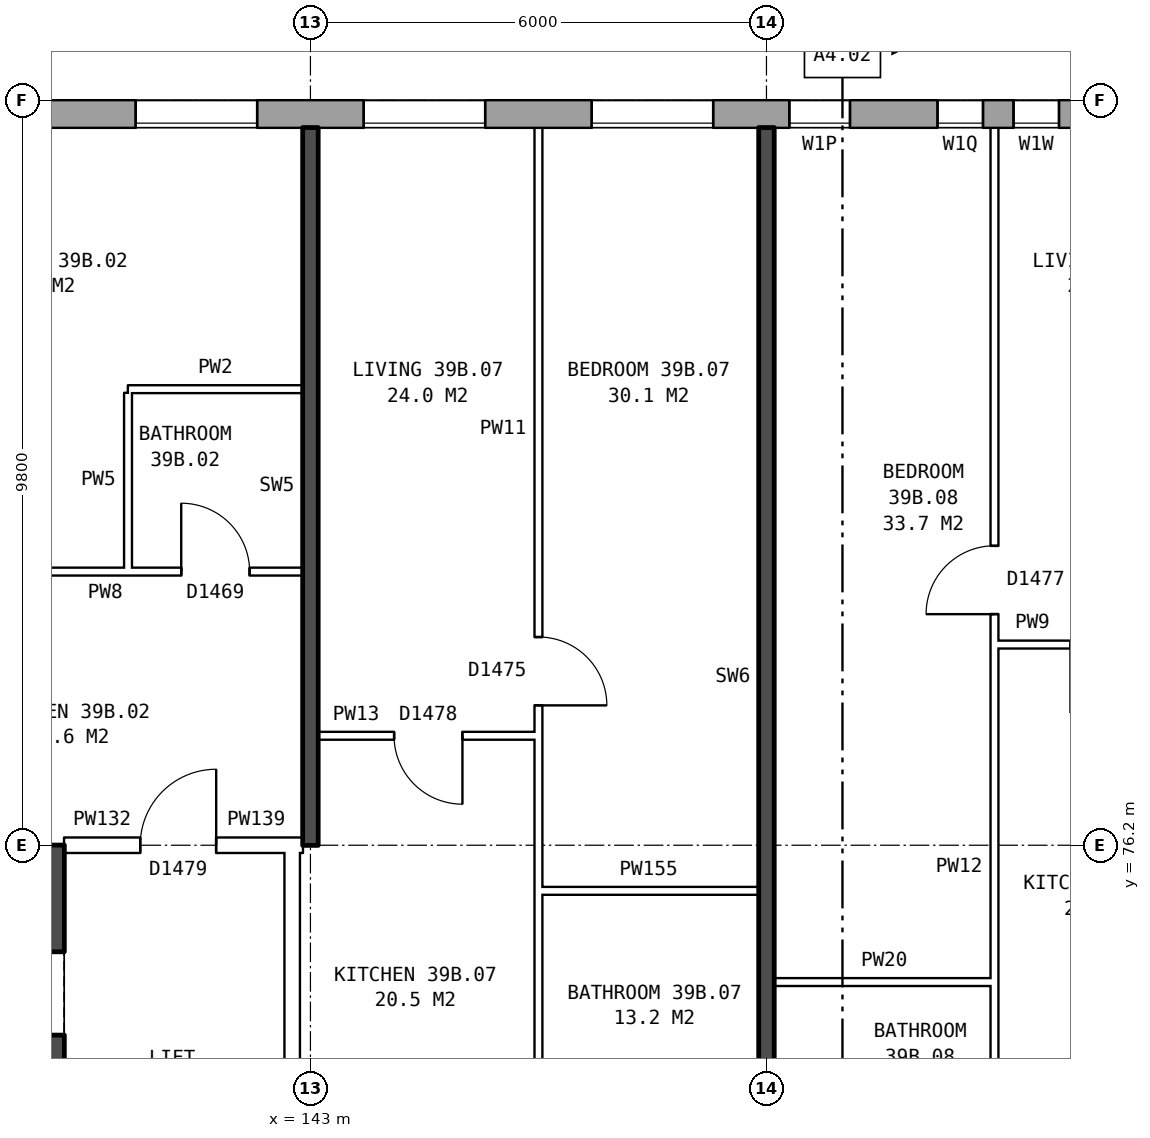
"""IFC4 building model, lengths in metres.
Left out: names, types, materials, properties, quantities, classifications, styles, units other than length and angle.
Written with IfcOpenShell. Run it as: python <this file> out.ifc"""

import sys

from ifc_helpers import new_model, si_unit, direction, frame, frame_2d, origin, place, context, subcontext, project, spatial, rectangle, extrude, element, fill, save


model = new_model("IFC4")
c1 = context("Model", 3, precision=1e-05, world=origin(), true_north=direction((0.0, 1.0)))
c2 = subcontext(c1, "Body", "Model", "MODEL_VIEW")
j1 = project(units=[si_unit("LENGTHUNIT", "METRE"), si_unit("PLANEANGLEUNIT", "RADIAN")], contexts=[c1])
p1 = place(None, origin())
s1 = spatial("IfcSite", under=j1, at=p1, CompositionType="ELEMENT")
p2 = place(p1, origin())
s2 = spatial("IfcBuilding", under=s1, at=p2, CompositionType="ELEMENT")
p3 = place(p2, frame((0.0, 0.0, 139.2)))
s3 = spatial("IfcBuildingStorey", under=s2, at=p3, CompositionType="ELEMENT", Elevation=139.2)
p4 = place(p3, frame((169.675, 85.82, 0.0), z_axis=(0.0, 0.0, 1.0), x_axis=(-1.0, 0.0, 0.0)))
e1 = element("IfcWall", 1, at=p4, inside=s3, PredefinedType="STANDARD", context=c2, shape_type="SweptSolid", body=[
    extrude(rectangle(XDim=35.601, YDim=0.36, at=frame_2d((17.8, 0.0))), origin(), (0.0, 0.0, 1.0), 2.85),
])
p5 = place(p4, frame((0.375, 0.0, 0.8)))
e2 = element("IfcOpeningElement", 2, at=p5, cuts=e1, PredefinedType="OPENING", context=c2, shape_type="SweptSolid", body=[
    extrude(rectangle(XDim=1.6, YDim=1.8, at=frame_2d((0.8, 0.9))), frame((0.0, 0.19, 0.0), z_axis=(0.0, -1.0, 0.0), x_axis=(1.0, 0.0, 0.0)), (0.0, 0.0, 1.0), 0.38),
])
p6 = place(p4, frame((3.375, 0.0, 0.8)))
e3 = element("IfcOpeningElement", 3, at=p6, cuts=e1, PredefinedType="OPENING", context=c2, shape_type="SweptSolid", body=[
    extrude(rectangle(XDim=1.6, YDim=1.8, at=frame_2d((0.8, 0.9))), frame((0.0, 0.19, 0.0), z_axis=(0.0, -1.0, 0.0), x_axis=(1.0, 0.0, 0.0)), (0.0, 0.0, 1.0), 0.38),
])
p7 = place(p4, frame((6.375, 0.0, 0.8)))
e4 = element("IfcOpeningElement", 4, at=p7, cuts=e1, PredefinedType="OPENING", context=c2, shape_type="SweptSolid", body=[
    extrude(rectangle(XDim=1.6, YDim=1.8, at=frame_2d((0.8, 0.9))), frame((0.0, 0.19, 0.0), z_axis=(0.0, -1.0, 0.0), x_axis=(1.0, 0.0, 0.0)), (0.0, 0.0, 1.0), 0.38),
])
p8 = place(p4, frame((9.375, 0.0, 0.8)))
e5 = element("IfcOpeningElement", 5, at=p8, cuts=e1, PredefinedType="OPENING", context=c2, shape_type="SweptSolid", body=[
    extrude(rectangle(XDim=1.6, YDim=1.8, at=frame_2d((0.8, 0.9))), frame((0.0, 0.19, 0.0), z_axis=(0.0, -1.0, 0.0), x_axis=(1.0, 0.0, 0.0)), (0.0, 0.0, 1.0), 0.38),
])
p9 = place(p4, frame((12.375, 0.0, 0.8)))
e6 = element("IfcOpeningElement", 6, at=p9, cuts=e1, PredefinedType="OPENING", context=c2, shape_type="SweptSolid", body=[
    extrude(rectangle(XDim=1.6, YDim=1.8, at=frame_2d((0.8, 0.9))), frame((0.0, 0.19, 0.0), z_axis=(0.0, -1.0, 0.0), x_axis=(1.0, 0.0, 0.0)), (0.0, 0.0, 1.0), 0.38),
])
p10 = place(p4, frame((14.875, 0.0, 1.65)))
e7 = element("IfcOpeningElement", 7, at=p10, cuts=e1, PredefinedType="OPENING", context=c2, shape_type="SweptSolid", body=[
    extrude(rectangle(XDim=1.4, YDim=0.9, at=frame_2d((0.7, 0.45))), frame((0.0, 0.19, 0.0), z_axis=(0.0, -1.0, 0.0), x_axis=(1.0, 0.0, 0.0)), (0.0, 0.0, 1.0), 0.38),
])
p11 = place(p4, frame((17.825, 0.0, 0.25)))
e8 = element("IfcOpeningElement", 8, at=p11, cuts=e1, PredefinedType="OPENING", context=c2, shape_type="SweptSolid", body=[
    extrude(rectangle(XDim=0.6, YDim=1.2, at=frame_2d((0.3, 0.6))), frame((0.0, 0.19, 0.0), z_axis=(0.0, -1.0, 0.0), x_axis=(1.0, 0.0, 0.0)), (0.0, 0.0, 1.0), 0.38),
])
p12 = place(p4, frame((21.375, 0.0, 0.8)))
e9 = element("IfcOpeningElement", 9, at=p12, cuts=e1, PredefinedType="OPENING", context=c2, shape_type="SweptSolid", body=[
    extrude(rectangle(XDim=1.6, YDim=1.8, at=frame_2d((0.8, 0.9))), frame((0.0, 0.19, 0.0), z_axis=(0.0, -1.0, 0.0), x_axis=(1.0, 0.0, 0.0)), (0.0, 0.0, 1.0), 0.38),
])
p13 = place(p4, frame((24.375, 0.0, 0.8)))
e10 = element("IfcOpeningElement", 10, at=p13, cuts=e1, PredefinedType="OPENING", context=c2, shape_type="SweptSolid", body=[
    extrude(rectangle(XDim=1.6, YDim=1.8, at=frame_2d((0.8, 0.9))), frame((0.0, 0.19, 0.0), z_axis=(0.0, -1.0, 0.0), x_axis=(1.0, 0.0, 0.0)), (0.0, 0.0, 1.0), 0.38),
])
p14 = place(p4, frame((27.375, 0.0, 0.8)))
e11 = element("IfcOpeningElement", 11, at=p14, cuts=e1, PredefinedType="OPENING", context=c2, shape_type="SweptSolid", body=[
    extrude(rectangle(XDim=1.6, YDim=1.8, at=frame_2d((0.8, 0.9))), frame((0.0, 0.19, 0.0), z_axis=(0.0, -1.0, 0.0), x_axis=(1.0, 0.0, 0.0)), (0.0, 0.0, 1.0), 0.38),
])
p15 = place(p4, frame((30.375, 0.0, 0.8)))
e12 = element("IfcOpeningElement", 12, at=p15, cuts=e1, PredefinedType="OPENING", context=c2, shape_type="SweptSolid", body=[
    extrude(rectangle(XDim=1.6, YDim=1.8, at=frame_2d((0.8, 0.9))), frame((0.0, 0.19, 0.0), z_axis=(0.0, -1.0, 0.0), x_axis=(1.0, 0.0, 0.0)), (0.0, 0.0, 1.0), 0.38),
])
p16 = place(p4, frame((33.375, 0.0, 0.8)))
e13 = element("IfcOpeningElement", 13, at=p16, cuts=e1, PredefinedType="OPENING", context=c2, shape_type="SweptSolid", body=[
    extrude(rectangle(XDim=1.6, YDim=1.8, at=frame_2d((0.8, 0.9))), frame((0.0, 0.19, 0.0), z_axis=(0.0, -1.0, 0.0), x_axis=(1.0, 0.0, 0.0)), (0.0, 0.0, 1.0), 0.38),
])
p17 = place(p4, frame((16.825, 0.0, 0.15)))
e14 = element("IfcOpeningElement", 14, at=p17, cuts=e1, PredefinedType="OPENING", context=c2, shape_type="SweptSolid", body=[
    extrude(rectangle(XDim=0.6, YDim=0.9, at=frame_2d((0.3, 0.45))), frame((0.0, 0.19, 0.0), z_axis=(0.0, -1.0, 0.0), x_axis=(1.0, 0.0, 0.0)), (0.0, 0.0, 1.0), 0.38),
])
p18 = place(p4, frame((19.575, 0.0, 1.35)))
e15 = element("IfcOpeningElement", 15, at=p18, cuts=e1, PredefinedType="OPENING", context=c2, shape_type="SweptSolid", body=[
    extrude(rectangle(XDim=0.8, YDim=1.2, at=frame_2d((0.4, 0.6))), frame((0.0, 0.19, 0.0), z_axis=(0.0, -1.0, 0.0), x_axis=(1.0, 0.0, 0.0)), (0.0, 0.0, 1.0), 0.38),
])
p19 = place(p3, frame((139.485, 63.8, 0.0), z_axis=(0.0, 0.0, 1.0), x_axis=(0.0, 1.0, 0.0)))
e16 = element("IfcWall", 16, at=p19, inside=s3, PredefinedType="SHEAR", context=c2, shape_type="SweptSolid", body=[
    extrude(rectangle(XDim=12.4, YDim=0.55, at=frame_2d((6.2, 0.0))), origin(), (0.0, 0.0, 1.0), 2.85),
])
p20 = place(p19, frame((1.325, 0.0, 0.0)))
e17 = element("IfcOpeningElement", 17, at=p20, cuts=e16, PredefinedType="OPENING", context=c2, shape_type="SweptSolid", body=[
    extrude(rectangle(XDim=1.1, YDim=2.1, at=frame_2d((0.55, 1.05))), frame((0.0, 0.285, 0.0), z_axis=(0.0, -1.0, 0.0), x_axis=(1.0, 0.0, 0.0)), (0.0, 0.0, 1.0), 0.57),
])
p21 = place(p19, frame((3.6, 0.0, 0.0)))
e18 = element("IfcOpeningElement", 18, at=p21, cuts=e16, PredefinedType="OPENING", context=c2, shape_type="SweptSolid", body=[
    extrude(rectangle(XDim=1.1, YDim=2.1, at=frame_2d((0.55, 1.05))), frame((0.0, 0.285, 0.0), z_axis=(0.0, -1.0, 0.0), x_axis=(1.0, 0.0, 0.0)), (0.0, 0.0, 1.0), 0.57),
])
p22 = place(p19, frame((5.8, 0.0, 0.0)))
e19 = element("IfcOpeningElement", 19, at=p22, cuts=e16, PredefinedType="OPENING", context=c2, shape_type="SweptSolid", body=[
    extrude(rectangle(XDim=1.1, YDim=2.1, at=frame_2d((0.55, 1.05))), frame((0.0, 0.285, 0.0), z_axis=(0.0, -1.0, 0.0), x_axis=(1.0, 0.0, 0.0)), (0.0, 0.0, 1.0), 0.57),
])
p23 = place(p19, frame((9.9, 0.0, 0.0)))
e20 = element("IfcOpeningElement", 20, at=p23, cuts=e16, PredefinedType="OPENING", context=c2, shape_type="SweptSolid", body=[
    extrude(rectangle(XDim=1.1, YDim=2.1, at=frame_2d((0.55, 1.05))), frame((0.0, 0.285, 0.0), z_axis=(0.0, -1.0, 0.0), x_axis=(1.0, 0.0, 0.0)), (0.0, 0.0, 1.0), 0.57),
])
p24 = place(p19, frame((8.125, 0.0, 0.0)))
e21 = element("IfcOpeningElement", 21, at=p24, cuts=e16, PredefinedType="OPENING", context=c2, shape_type="SweptSolid", body=[
    extrude(rectangle(XDim=0.85, YDim=2.1, at=frame_2d((0.425, 1.05))), frame((0.0, 0.285, 0.0), z_axis=(0.0, -1.0, 0.0), x_axis=(1.0, 0.0, 0.0)), (0.0, 0.0, 1.0), 0.57),
])
p25 = place(p3, frame((142.76, 63.9, 0.0), z_axis=(0.0, 0.0, 1.0), x_axis=(0.0, 1.0, 0.0)))
e22 = element("IfcWall", 22, at=p25, inside=s3, PredefinedType="PARTITIONING", context=c2, shape_type="SweptSolid", body=[
    extrude(rectangle(XDim=12.2, YDim=0.2, at=frame_2d((6.1, 0.0))), origin(), (0.0, 0.0, 1.0), 2.85),
])
p26 = place(p25, frame((5.1, 0.0, 0.0)))
e23 = element("IfcOpeningElement", 23, at=p26, cuts=e22, PredefinedType="OPENING", context=c2, shape_type="SweptSolid", body=[
    extrude(rectangle(XDim=2.0, YDim=2.1, at=frame_2d((1.0, 1.05))), frame((0.0, 0.11, 0.0), z_axis=(0.0, -1.0, 0.0), x_axis=(1.0, 0.0, 0.0)), (0.0, 0.0, 1.0), 0.22),
])
for number, where, z_axis, x_axis in (
    (24, (149.1, 74.4, 0.0), (0.0, 0.0, 1.0), (1.0, 0.0, 0.0)),
    (25, (146.0, 75.6, 0.0), (0.0, 0.0, 1.0), (1.0, 0.0, 0.0)),
):
    element("IfcWall", number, at=place(p3, frame(where, z_axis=z_axis, x_axis=x_axis)), inside=s3, PredefinedType="PARTITIONING", context=c2, shape_type="SweptSolid", body=[
        extrude(rectangle(XDim=2.9, YDim=0.1, at=frame_2d((1.45, 0.0))), origin(), (0.0, 0.0, 1.0), 2.85),
    ])
p27 = place(p3, frame((139.76, 76.2, 0.0), z_axis=(0.0, 0.0, 1.0), x_axis=(1.0, 0.0, 0.0)))
e26 = element("IfcWall", 26, at=p27, inside=s3, PredefinedType="PARTITIONING", context=c2, shape_type="SweptSolid", body=[
    extrude(rectangle(XDim=3.0, YDim=0.2, at=frame_2d((1.5, 0.0))), origin(), (0.0, 0.0, 1.0), 2.85),
])
p28 = place(p27, frame((1.0, 0.0, 0.0)))
e27 = element("IfcOpeningElement", 27, at=p28, cuts=e26, PredefinedType="OPENING", context=c2, shape_type="SweptSolid", body=[
    extrude(rectangle(XDim=1.0, YDim=2.1, at=frame_2d((0.5, 1.05))), frame((0.0, 0.11, 0.0), z_axis=(0.0, -1.0, 0.0), x_axis=(1.0, 0.0, 0.0)), (0.0, 0.0, 1.0), 0.22),
])
p29 = place(p3, frame((142.76, 76.2, 0.0), z_axis=(0.0, 0.0, 1.0), x_axis=(1.0, 0.0, 0.0)))
e28 = element("IfcWall", 28, at=p29, inside=s3, PredefinedType="PARTITIONING", context=c2, shape_type="SweptSolid", body=[
    extrude(rectangle(XDim=0.14, YDim=0.2, at=frame_2d((0.07, 0.0))), origin(), (0.0, 0.0, 1.0), 2.85),
])
p30 = place(p3, frame((143.1, 77.64, 0.0), z_axis=(0.0, 0.0, 1.0), x_axis=(1.0, 0.0, 0.0)))
e29 = element("IfcWall", 29, at=p30, inside=s3, PredefinedType="PARTITIONING", context=c2, shape_type="SweptSolid", body=[
    extrude(rectangle(XDim=2.9, YDim=0.1, at=frame_2d((1.45, 0.0))), origin(), (0.0, 0.0, 1.0), 2.85),
])
p31 = place(p30, frame((1.0, 0.0, 0.0)))
e30 = element("IfcOpeningElement", 30, at=p31, cuts=e29, PredefinedType="OPENING", context=c2, shape_type="SweptSolid", body=[
    extrude(rectangle(XDim=0.9, YDim=2.1, at=frame_2d((0.45, 1.05))), frame((0.0, 0.06, 0.0), z_axis=(0.0, -1.0, 0.0), x_axis=(1.0, 0.0, 0.0)), (0.0, 0.0, 1.0), 0.12),
])
p32 = place(p3, frame((152.0, 78.84, 0.0), z_axis=(0.0, 0.0, 1.0), x_axis=(1.0, 0.0, 0.0)))
e31 = element("IfcWall", 31, at=p32, inside=s3, PredefinedType="PARTITIONING", context=c2, shape_type="SweptSolid", body=[
    extrude(rectangle(XDim=2.9, YDim=0.1, at=frame_2d((1.45, 0.0))), origin(), (0.0, 0.0, 1.0), 2.85),
])
p33 = place(p32, frame((1.0, 0.0, 0.0)))
e32 = element("IfcOpeningElement", 32, at=p33, cuts=e31, PredefinedType="OPENING", context=c2, shape_type="SweptSolid", body=[
    extrude(rectangle(XDim=0.9, YDim=2.1, at=frame_2d((0.45, 1.05))), frame((0.0, 0.06, 0.0), z_axis=(0.0, -1.0, 0.0), x_axis=(1.0, 0.0, 0.0)), (0.0, 0.0, 1.0), 0.12),
])
p34 = place(p3, frame((137.1, 79.8, 0.0), z_axis=(0.0, 0.0, 1.0), x_axis=(1.0, 0.0, 0.0)))
e33 = element("IfcWall", 33, at=p34, inside=s3, PredefinedType="PARTITIONING", context=c2, shape_type="SweptSolid", body=[
    extrude(rectangle(XDim=5.8, YDim=0.1, at=frame_2d((2.9, 0.0))), origin(), (0.0, 0.0, 1.0), 2.85),
])
p35 = place(p34, frame((1.3, 0.0, 0.0)))
e34 = element("IfcOpeningElement", 34, at=p35, cuts=e33, PredefinedType="OPENING", context=c2, shape_type="SweptSolid", body=[
    extrude(rectangle(XDim=0.9, YDim=2.1, at=frame_2d((0.45, 1.05))), frame((0.0, 0.06, 0.0), z_axis=(0.0, -1.0, 0.0), x_axis=(1.0, 0.0, 0.0)), (0.0, 0.0, 1.0), 0.12),
])
p36 = place(p34, frame((4.2, 0.0, 0.0)))
e35 = element("IfcOpeningElement", 35, at=p36, cuts=e33, PredefinedType="OPENING", context=c2, shape_type="SweptSolid", body=[
    extrude(rectangle(XDim=0.9, YDim=2.1, at=frame_2d((0.45, 1.05))), frame((0.0, 0.06, 0.0), z_axis=(0.0, -1.0, 0.0), x_axis=(1.0, 0.0, 0.0)), (0.0, 0.0, 1.0), 0.12),
])
for number, where, z_axis, x_axis in (
    (36, (140.6, 82.2, 0.0), (0.0, 0.0, 1.0), (1.0, 0.0, 0.0)),
    (37, (140.6, 79.85, 0.0), (0.0, 0.0, 1.0), (0.0, 1.0, 0.0)),
):
    element("IfcWall", number, at=place(p3, frame(where, z_axis=z_axis, x_axis=x_axis)), inside=s3, PredefinedType="PARTITIONING", context=c2, shape_type="SweptSolid", body=[
        extrude(rectangle(XDim=2.3, YDim=0.1, at=frame_2d((1.15, 0.0))), origin(), (0.0, 0.0, 1.0), 2.85),
    ])
p37 = place(p3, frame((143.0, 76.2, 0.0), z_axis=(0.0, 0.0, 1.0), x_axis=(0.0, 1.0, 0.0)))
e38 = element("IfcWall", 38, at=p37, inside=s3, PredefinedType="SOLIDWALL", context=c2, shape_type="SweptSolid", body=[
    extrude(rectangle(XDim=9.44, YDim=0.2, at=frame_2d((4.72, 0.0))), origin(), (0.0, 0.0, 1.0), 2.85),
])
p38 = place(p3, frame((146.0, 71.3, 0.0), z_axis=(0.0, 0.0, 1.0), x_axis=(0.0, 1.0, 0.0)))
e39 = element("IfcWall", 39, at=p38, inside=s3, PredefinedType="PARTITIONING", context=c2, shape_type="SweptSolid", body=[
    extrude(rectangle(XDim=14.34, YDim=0.1, at=frame_2d((7.17, 0.0))), origin(), (0.0, 0.0, 1.0), 2.85),
])
p39 = place(p38, frame((6.74, 0.0, 0.0)))
e40 = element("IfcOpeningElement", 40, at=p39, cuts=e39, PredefinedType="OPENING", context=c2, shape_type="SweptSolid", body=[
    extrude(rectangle(XDim=0.9, YDim=2.1, at=frame_2d((0.45, 1.05))), frame((0.0, 0.06, 0.0), z_axis=(0.0, -1.0, 0.0), x_axis=(1.0, 0.0, 0.0)), (0.0, 0.0, 1.0), 0.12),
])
p40 = place(p38, frame((0.4, 0.0, 0.0)))
e41 = element("IfcOpeningElement", 41, at=p40, cuts=e39, PredefinedType="OPENING", context=c2, shape_type="SweptSolid", body=[
    extrude(rectangle(XDim=0.9, YDim=2.1, at=frame_2d((0.45, 1.05))), frame((0.0, 0.06, 0.0), z_axis=(0.0, -1.0, 0.0), x_axis=(1.0, 0.0, 0.0)), (0.0, 0.0, 1.0), 0.12),
])
p41 = place(p3, frame((149.0, 71.2, 0.0), z_axis=(0.0, 0.0, 1.0), x_axis=(0.0, 1.0, 0.0)))
e42 = element("IfcWall", 42, at=p41, inside=s3, PredefinedType="SOLIDWALL", context=c2, shape_type="SweptSolid", body=[
    extrude(rectangle(XDim=14.44, YDim=0.2, at=frame_2d((7.22, 0.0))), origin(), (0.0, 0.0, 1.0), 2.85),
])
p42 = place(p3, frame((152.0, 71.3, 0.0), z_axis=(0.0, 0.0, 1.0), x_axis=(0.0, 1.0, 0.0)))
e43 = element("IfcWall", 43, at=p42, inside=s3, PredefinedType="PARTITIONING", context=c2, shape_type="SweptSolid", body=[
    extrude(rectangle(XDim=14.34, YDim=0.1, at=frame_2d((7.17, 0.0))), origin(), (0.0, 0.0, 1.0), 2.85),
])
p43 = place(p42, frame((7.94, 0.0, 0.0)))
e44 = element("IfcOpeningElement", 44, at=p43, cuts=e43, PredefinedType="OPENING", context=c2, shape_type="SweptSolid", body=[
    extrude(rectangle(XDim=0.9, YDim=2.1, at=frame_2d((0.45, 1.05))), frame((0.0, 0.06, 0.0), z_axis=(0.0, -1.0, 0.0), x_axis=(1.0, 0.0, 0.0)), (0.0, 0.0, 1.0), 0.12),
])
p44 = place(p42, frame((0.4, 0.0, 0.0)))
e45 = element("IfcOpeningElement", 45, at=p44, cuts=e43, PredefinedType="OPENING", context=c2, shape_type="SweptSolid", body=[
    extrude(rectangle(XDim=0.9, YDim=2.1, at=frame_2d((0.45, 1.05))), frame((0.0, 0.06, 0.0), z_axis=(0.0, -1.0, 0.0), x_axis=(1.0, 0.0, 0.0)), (0.0, 0.0, 1.0), 0.12),
])
p45 = place(p11, origin())
e46 = element("IfcWindow", 46, at=p45, inside=s3, PartitioningType="SINGLE_PANEL", PredefinedType="WINDOW", context=c2, shape_type="SweptSolid", body=[
    extrude(rectangle(XDim=0.6, YDim=1.2, at=frame_2d((0.3, 0.6))), frame((0.0, 0.15, 0.0), z_axis=(0.0, -1.0, 0.0), x_axis=(1.0, 0.0, 0.0)), (0.0, 0.0, 1.0), 0.06),
])
fill(e8, e46)
p46 = place(p12, origin())
e47 = element("IfcWindow", 47, at=p46, inside=s3, PartitioningType="SINGLE_PANEL", PredefinedType="WINDOW", context=c2, shape_type="SweptSolid", body=[
    extrude(rectangle(XDim=1.6, YDim=1.8, at=frame_2d((0.8, 0.9))), frame((0.0, 0.15, 0.0), z_axis=(0.0, -1.0, 0.0), x_axis=(1.0, 0.0, 0.0)), (0.0, 0.0, 1.0), 0.06),
])
fill(e9, e47)
p47 = place(p13, origin())
e48 = element("IfcWindow", 48, at=p47, inside=s3, PartitioningType="SINGLE_PANEL", PredefinedType="WINDOW", context=c2, shape_type="SweptSolid", body=[
    extrude(rectangle(XDim=1.6, YDim=1.8, at=frame_2d((0.8, 0.9))), frame((0.0, 0.15, 0.0), z_axis=(0.0, -1.0, 0.0), x_axis=(1.0, 0.0, 0.0)), (0.0, 0.0, 1.0), 0.06),
])
fill(e10, e48)
p48 = place(p14, origin())
e49 = element("IfcWindow", 49, at=p48, inside=s3, PartitioningType="SINGLE_PANEL", PredefinedType="WINDOW", context=c2, shape_type="SweptSolid", body=[
    extrude(rectangle(XDim=1.6, YDim=1.8, at=frame_2d((0.8, 0.9))), frame((0.0, 0.15, 0.0), z_axis=(0.0, -1.0, 0.0), x_axis=(1.0, 0.0, 0.0)), (0.0, 0.0, 1.0), 0.06),
])
fill(e11, e49)
p49 = place(p28, origin())
e50 = element("IfcDoor", 50, at=p49, inside=s3, OperationType="SINGLE_SWING_RIGHT", PredefinedType="DOOR", context=c2, shape_type="SweptSolid", body=[
    extrude(rectangle(XDim=1.0, YDim=2.1, at=frame_2d((0.5, 1.05))), frame((0.0, 0.025, 0.0), z_axis=(0.0, -1.0, 0.0), x_axis=(1.0, 0.0, 0.0)), (0.0, 0.0, 1.0), 0.05),
])
fill(e27, e50)
p50 = place(p36, origin())
e51 = element("IfcDoor", 51, at=p50, inside=s3, OperationType="SINGLE_SWING_LEFT", PredefinedType="DOOR", context=c2, shape_type="SweptSolid", body=[
    extrude(rectangle(XDim=0.9, YDim=2.1, at=frame_2d((0.45, 1.05))), frame((0.0, 0.025, 0.0), z_axis=(0.0, -1.0, 0.0), x_axis=(1.0, 0.0, 0.0)), (0.0, 0.0, 1.0), 0.05),
])
fill(e35, e51)
p51 = place(p39, frame((0.9, 0.0, 0.0), z_axis=(0.0, 0.0, 1.0), x_axis=(-1.0, 0.0, 0.0)))
e52 = element("IfcDoor", 52, at=p51, inside=s3, OperationType="SINGLE_SWING_RIGHT", PredefinedType="DOOR", context=c2, shape_type="SweptSolid", body=[
    extrude(rectangle(XDim=0.9, YDim=2.1, at=frame_2d((0.45, 1.05))), frame((0.0, 0.025, 0.0), z_axis=(0.0, -1.0, 0.0), x_axis=(1.0, 0.0, 0.0)), (0.0, 0.0, 1.0), 0.05),
])
fill(e40, e52)
p52 = place(p31, frame((0.9, 0.0, 0.0), z_axis=(0.0, 0.0, 1.0), x_axis=(-1.0, 0.0, 0.0)))
e53 = element("IfcDoor", 53, at=p52, inside=s3, OperationType="SINGLE_SWING_LEFT", PredefinedType="DOOR", context=c2, shape_type="SweptSolid", body=[
    extrude(rectangle(XDim=0.9, YDim=2.1, at=frame_2d((0.45, 1.05))), frame((0.0, 0.025, 0.0), z_axis=(0.0, -1.0, 0.0), x_axis=(1.0, 0.0, 0.0)), (0.0, 0.0, 1.0), 0.05),
])
fill(e30, e53)
p53 = place(p43, origin())
e54 = element("IfcDoor", 54, at=p53, inside=s3, OperationType="SINGLE_SWING_LEFT", PredefinedType="DOOR", context=c2, shape_type="SweptSolid", body=[
    extrude(rectangle(XDim=0.9, YDim=2.1, at=frame_2d((0.45, 1.05))), frame((0.0, 0.025, 0.0), z_axis=(0.0, -1.0, 0.0), x_axis=(1.0, 0.0, 0.0)), (0.0, 0.0, 1.0), 0.05),
])
fill(e44, e54)
p54 = place(p17, origin())
e55 = element("IfcWindow", 55, at=p54, inside=s3, PartitioningType="SINGLE_PANEL", PredefinedType="WINDOW", context=c2, shape_type="SweptSolid", body=[
    extrude(rectangle(XDim=0.6, YDim=0.9, at=frame_2d((0.3, 0.45))), frame((0.0, 0.15, 0.0), z_axis=(0.0, -1.0, 0.0), x_axis=(1.0, 0.0, 0.0)), (0.0, 0.0, 1.0), 0.06),
])
fill(e14, e55)
p55 = place(p18, origin())
e56 = element("IfcWindow", 56, at=p55, inside=s3, PartitioningType="SINGLE_PANEL", PredefinedType="WINDOW", context=c2, shape_type="SweptSolid", body=[
    extrude(rectangle(XDim=0.8, YDim=1.2, at=frame_2d((0.4, 0.6))), frame((0.0, 0.15, 0.0), z_axis=(0.0, -1.0, 0.0), x_axis=(1.0, 0.0, 0.0)), (0.0, 0.0, 1.0), 0.06),
])
fill(e15, e56)
save(model, sys.argv[1])
